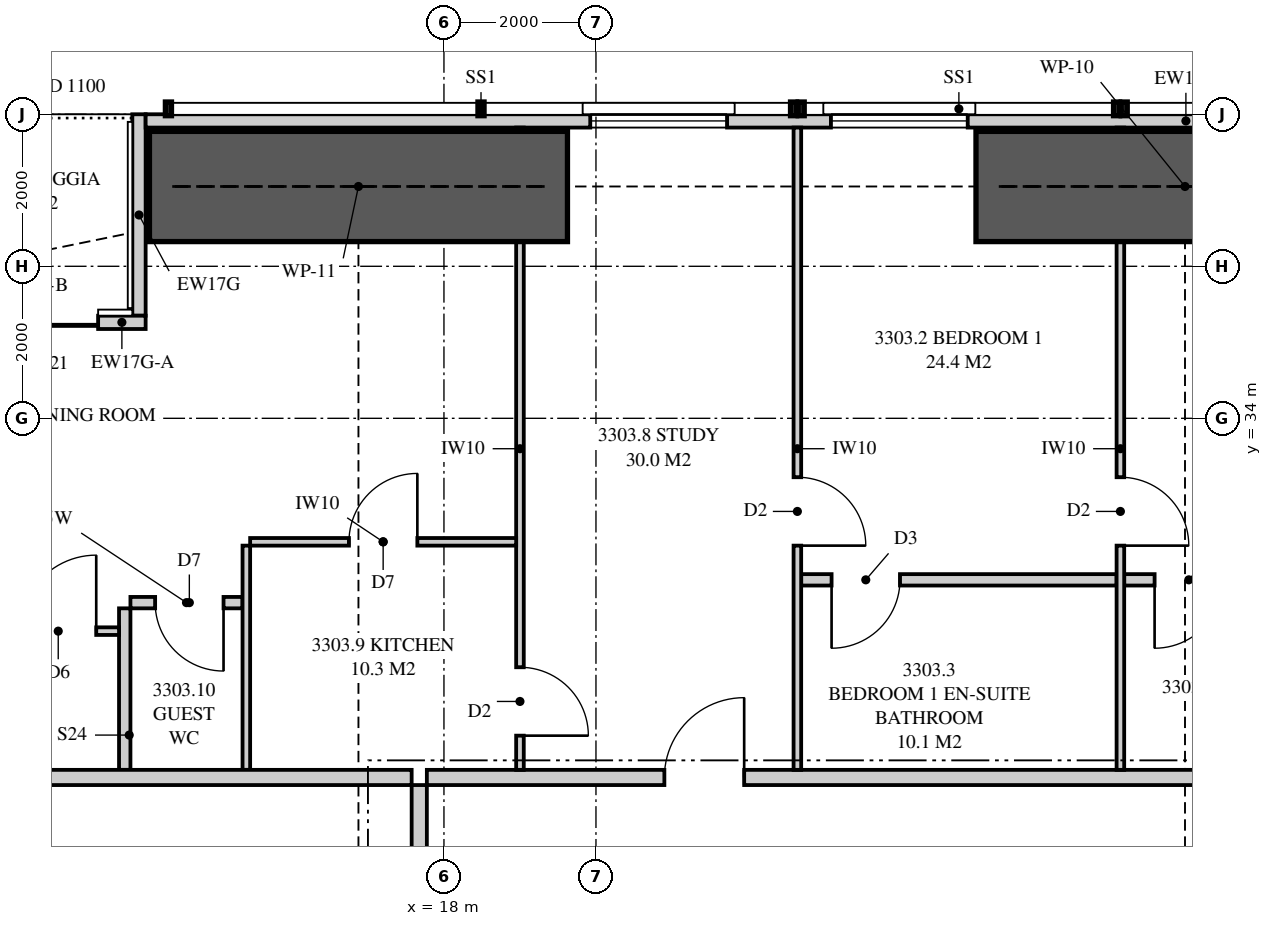
"""IFC4 building model, lengths in metres.
Left out: names, types, materials, properties, quantities, classifications, styles, units other than length and angle.
Written with IfcOpenShell. Run it as: python <this file> out.ifc"""

import sys

from ifc_helpers import new_model, si_unit, direction, frame, frame_2d, origin, place, context, subcontext, project, spatial, polyline, rectangle, outline, extrude, element, fill, save


model = new_model("IFC4")
c1 = context("Model", 3, precision=1e-05, world=origin(), true_north=direction((0.0, 1.0)))
c2 = subcontext(c1, "Body", "Model", "MODEL_VIEW")
j1 = project(units=[si_unit("LENGTHUNIT", "METRE"), si_unit("PLANEANGLEUNIT", "RADIAN")], contexts=[c1])
p1 = place(None, origin())
s1 = spatial("IfcSite", under=j1, at=p1, CompositionType="ELEMENT")
p2 = place(p1, origin())
s2 = spatial("IfcBuilding", under=s1, at=p2, CompositionType="ELEMENT")
p3 = place(p2, frame((0.0, 0.0, 121.6)))
s3 = spatial("IfcBuildingStorey", under=s2, at=p3, CompositionType="ELEMENT", Elevation=121.6)
p4 = place(p3, frame((41.449, 37.913, 0.0), z_axis=(0.0, 0.0, 1.0), x_axis=(-1.0, 0.0, 0.0)))
e1 = element("IfcWall", 1, at=p4, inside=s3, PredefinedType="SOLIDWALL", context=c2, shape_type="SweptSolid", body=[
    extrude(outline(polyline([(0.0, 0.0), (27.374, 0.0), (27.374, 3.11), (24.777, 3.11), (24.777, 2.15), (24.732, 2.15), (24.732, 3.11), (24.574, 3.11), (24.574, 2.15), (2.824, 2.15), (2.824, 3.11), (2.666, 3.11), (2.666, 2.15), (2.62, 2.15), (2.62, 3.11), (0.0, 3.11), (0.0, 0.0)])), frame((0.0, 0.087, 0.0), z_axis=(0.0, -1.0, 0.0), x_axis=(1.0, 0.0, 0.0)), (0.0, 0.0, 1.0), 0.175),
])
p5 = place(p4, frame((5.699, 0.0, 0.4)))
e2 = element("IfcOpeningElement", 2, at=p5, cuts=e1, PredefinedType="OPENING", context=c2, shape_type="SweptSolid", body=[
    extrude(rectangle(XDim=1.8, YDim=1.7, at=frame_2d((0.9, 0.85))), frame((0.0, 0.097, 0.0), z_axis=(0.0, -1.0, 0.0), x_axis=(1.0, 0.0, 0.0)), (0.0, 0.0, 1.0), 0.195),
])
p6 = place(p4, frame((9.034, 0.0, 0.4)))
e3 = element("IfcOpeningElement", 3, at=p6, cuts=e1, PredefinedType="OPENING", context=c2, shape_type="SweptSolid", body=[
    extrude(rectangle(XDim=1.8, YDim=1.7, at=frame_2d((0.9, 0.85))), frame((0.0, 0.097, 0.0), z_axis=(0.0, -1.0, 0.0), x_axis=(1.0, 0.0, 0.0)), (0.0, 0.0, 1.0), 0.195),
])
p7 = place(p4, frame((16.558, 0.0, 0.4)))
e4 = element("IfcOpeningElement", 4, at=p7, cuts=e1, PredefinedType="OPENING", context=c2, shape_type="SweptSolid", body=[
    extrude(rectangle(XDim=1.8, YDim=1.7, at=frame_2d((0.9, 0.85))), frame((0.0, 0.097, 0.0), z_axis=(0.0, -1.0, 0.0), x_axis=(1.0, 0.0, 0.0)), (0.0, 0.0, 1.0), 0.195),
])
p8 = place(p4, frame((19.724, 0.0, 0.4)))
e5 = element("IfcOpeningElement", 5, at=p8, cuts=e1, PredefinedType="OPENING", context=c2, shape_type="SweptSolid", body=[
    extrude(rectangle(XDim=1.8, YDim=1.7, at=frame_2d((0.9, 0.85))), frame((0.0, 0.097, 0.0), z_axis=(0.0, -1.0, 0.0), x_axis=(1.0, 0.0, 0.0)), (0.0, 0.0, 1.0), 0.195),
])
p9 = place(p3, frame((14.075, 35.262, 0.0), z_axis=(0.0, 0.0, 1.0), x_axis=(-1.0, 0.0, 0.0)))
e6 = element("IfcWall", 6, at=p9, inside=s3, PredefinedType="SOLIDWALL", context=c2, shape_type="SweptSolid", body=[
    extrude(rectangle(XDim=0.625, YDim=0.175, at=frame_2d((0.312, 0.0))), origin(), (0.0, 0.0, 1.0), 3.11),
])
p10 = place(p3, frame((13.45, 35.262, 0.0), z_axis=(0.0, 0.0, 1.0), x_axis=(-1.0, 0.0, 0.0)))
e7 = element("IfcWall", 7, at=p10, inside=s3, PredefinedType="SOLIDWALL", context=c2, shape_type="SweptSolid", body=[
    extrude(rectangle(XDim=2.425, YDim=0.175, at=frame_2d((1.212, 0.0))), origin(), (0.0, 0.0, 1.0), 2.15),
])
p11 = place(p10, origin())
e8 = element("IfcOpeningElement", 8, at=p11, cuts=e7, PredefinedType="OPENING", context=c2, shape_type="SweptSolid", body=[
    extrude(rectangle(XDim=1.8, YDim=2.1, at=frame_2d((0.9, 1.05))), frame((0.0, 0.097, 0.0), z_axis=(0.0, -1.0, 0.0), x_axis=(1.0, 0.0, 0.0)), (0.0, 0.0, 1.0), 0.195),
])
p12 = place(p3, frame((13.988, 38.0, 0.0), z_axis=(0.0, 0.0, 1.0), x_axis=(0.0, -1.0, 0.0)))
e9 = element("IfcWall", 9, at=p12, inside=s3, PredefinedType="SOLIDWALL", context=c2, shape_type="SweptSolid", body=[
    extrude(outline(polyline([(0.0, 0.0), (2.65, 0.0), (2.65, 3.11), (2.373, 3.11), (2.373, 2.15), (0.705, 2.15), (0.705, 3.11), (0.0, 3.11), (0.0, 0.0)])), frame((0.0, 0.087, 0.0), z_axis=(0.0, -1.0, 0.0), x_axis=(1.0, 0.0, 0.0)), (0.0, 0.0, 1.0), 0.175),
])
p13 = place(p3, frame((17.775, 29.275, 0.0), z_axis=(0.0, 0.0, 1.0), x_axis=(1.0, 0.0, 0.0)))
e10 = element("IfcWall", 10, at=p13, inside=s3, PredefinedType="PARTITIONING", context=c2, shape_type="SweptSolid", body=[
    extrude(outline(polyline([(0.0, 0.0), (18.925, 0.0), (18.925, 3.11), (10.312, 3.11), (10.312, 2.541), (9.638, 2.541), (9.638, 3.11), (0.0, 3.11), (0.0, 0.0)])), frame((0.0, 0.1, 0.0), z_axis=(0.0, -1.0, 0.0), x_axis=(1.0, 0.0, 0.0)), (0.0, 0.0, 1.0), 0.2),
])
p14 = place(p13, frame((3.125, 0.0, 0.0)))
e11 = element("IfcOpeningElement", 11, at=p14, cuts=e10, PredefinedType="OPENING", context=c2, shape_type="SweptSolid", body=[
    extrude(rectangle(XDim=1.05, YDim=2.2, at=frame_2d((0.525, 1.1))), frame((0.0, 0.11, 0.0), z_axis=(0.0, -1.0, 0.0), x_axis=(1.0, 0.0, 0.0)), (0.0, 0.0, 1.0), 0.22),
])
p15 = place(p3, frame((22.65, 37.825, 0.0), z_axis=(0.0, 0.0, 1.0), x_axis=(0.0, -1.0, 0.0)))
e12 = element("IfcWall", 12, at=p15, inside=s3, PredefinedType="PARTITIONING", context=c2, shape_type="SweptSolid", body=[
    extrude(outline(polyline([(0.0, 0.0), (8.45, 0.0), (8.45, 3.11), (1.635, 3.11), (1.635, 2.15), (0.0, 2.15), (0.0, 3.11), (0.0, 0.0)])), frame((0.0, 0.05, 0.0), z_axis=(0.0, -1.0, 0.0), x_axis=(1.0, 0.0, 0.0)), (0.0, 0.0, 1.0), 0.1),
])
p16 = place(p15, frame((4.6, 0.0, 0.0)))
e13 = element("IfcOpeningElement", 13, at=p16, cuts=e12, PredefinedType="OPENING", context=c2, shape_type="SweptSolid", body=[
    extrude(rectangle(XDim=0.9, YDim=2.1, at=frame_2d((0.45, 1.05))), frame((0.0, 0.06, 0.0), z_axis=(0.0, -1.0, 0.0), x_axis=(1.0, 0.0, 0.0)), (0.0, 0.0, 1.0), 0.12),
])
p17 = place(p3, frame((26.9, 37.825, 0.0), z_axis=(0.0, 0.0, 1.0), x_axis=(0.0, -1.0, 0.0)))
e14 = element("IfcWall", 14, at=p17, inside=s3, PredefinedType="PARTITIONING", context=c2, shape_type="SweptSolid", body=[
    extrude(outline(polyline([(0.529, 2.15), (0.0, 2.15), (0.0, 0.0), (0.529, 0.0), (0.529, 0.889), (1.021, 0.889), (1.021, 0.0), (8.45, 0.0), (8.45, 3.11), (1.635, 3.11), (1.635, 2.15), (1.021, 2.15), (1.021, 1.261), (0.529, 1.261), (0.529, 2.15)])), frame((0.0, 0.05, 0.0), z_axis=(0.0, -1.0, 0.0), x_axis=(1.0, 0.0, 0.0)), (0.0, 0.0, 1.0), 0.1),
])
p18 = place(p17, frame((4.6, 0.0, 0.0)))
e15 = element("IfcOpeningElement", 15, at=p18, cuts=e14, PredefinedType="OPENING", context=c2, shape_type="SweptSolid", body=[
    extrude(rectangle(XDim=0.9, YDim=2.1, at=frame_2d((0.45, 1.05))), frame((0.0, 0.06, 0.0), z_axis=(0.0, -1.0, 0.0), x_axis=(1.0, 0.0, 0.0)), (0.0, 0.0, 1.0), 0.12),
])
p19 = place(p3, frame((22.7, 31.875, 0.0), z_axis=(0.0, 0.0, 1.0), x_axis=(1.0, 0.0, 0.0)))
e16 = element("IfcWall", 16, at=p19, inside=s3, PredefinedType="PLUMBINGWALL", context=c2, shape_type="SweptSolid", body=[
    extrude(rectangle(XDim=4.15, YDim=0.15, at=frame_2d((2.075, 0.0))), origin(), (0.0, 0.0, 1.0), 3.11),
])
p20 = place(p19, frame((0.4, 0.0, 0.0)))
e17 = element("IfcOpeningElement", 17, at=p20, cuts=e16, PredefinedType="OPENING", context=c2, shape_type="SweptSolid", body=[
    extrude(rectangle(XDim=0.9, YDim=2.1, at=frame_2d((0.45, 1.05))), frame((0.0, 0.085, 0.0), z_axis=(0.0, -1.0, 0.0), x_axis=(1.0, 0.0, 0.0)), (0.0, 0.0, 1.0), 0.17),
])
p21 = place(p3, frame((26.95, 31.875, 0.0), z_axis=(0.0, 0.0, 1.0), x_axis=(1.0, 0.0, 0.0)))
e18 = element("IfcWall", 18, at=p21, inside=s3, PredefinedType="PLUMBINGWALL", context=c2, shape_type="SweptSolid", body=[
    extrude(outline(polyline([(0.0, 0.0), (5.9, 0.0), (5.9, 3.11), (1.112, 3.11), (1.112, 2.541), (0.488, 2.541), (0.488, 3.11), (0.0, 3.11), (0.0, 0.0)])), frame((0.0, 0.075, 0.0), z_axis=(0.0, -1.0, 0.0), x_axis=(1.0, 0.0, 0.0)), (0.0, 0.0, 1.0), 0.15),
])
p22 = place(p21, frame((0.4, 0.0, 0.0)))
e19 = element("IfcOpeningElement", 19, at=p22, cuts=e18, PredefinedType="OPENING", context=c2, shape_type="SweptSolid", body=[
    extrude(rectangle(XDim=0.9, YDim=2.1, at=frame_2d((0.45, 1.05))), frame((0.0, 0.085, 0.0), z_axis=(0.0, -1.0, 0.0), x_axis=(1.0, 0.0, 0.0)), (0.0, 0.0, 1.0), 0.17),
])
p23 = place(p3, frame((19.0, 37.825, 0.0), z_axis=(0.0, 0.0, 1.0), x_axis=(0.0, -1.0, 0.0)))
e20 = element("IfcWall", 20, at=p23, inside=s3, PredefinedType="PARTITIONING", context=c2, shape_type="SweptSolid", body=[
    extrude(outline(polyline([(0.529, 2.15), (0.0, 2.15), (0.0, 0.0), (0.529, 0.0), (0.529, 0.017), (1.021, 0.017), (1.021, 0.0), (8.45, 0.0), (8.45, 3.11), (1.635, 3.11), (1.635, 2.15), (1.021, 2.15), (1.021, 2.133), (0.529, 2.133), (0.529, 2.15)])), frame((0.0, 0.05, 0.0), z_axis=(0.0, -1.0, 0.0), x_axis=(1.0, 0.0, 0.0)), (0.0, 0.0, 1.0), 0.1),
])
p24 = place(p23, frame((7.1, 0.0, 0.0)))
e21 = element("IfcOpeningElement", 21, at=p24, cuts=e20, PredefinedType="OPENING", context=c2, shape_type="SweptSolid", body=[
    extrude(rectangle(XDim=0.9, YDim=2.1, at=frame_2d((0.45, 1.05))), frame((0.0, 0.06, 0.0), z_axis=(0.0, -1.0, 0.0), x_axis=(1.0, 0.0, 0.0)), (0.0, 0.0, 1.0), 0.12),
])
p25 = place(p3, frame((15.45, 32.375, 0.0), z_axis=(0.0, 0.0, 1.0), x_axis=(1.0, 0.0, 0.0)))
e22 = element("IfcWall", 22, at=p25, inside=s3, PredefinedType="PARTITIONING", context=c2, shape_type="SweptSolid", body=[
    extrude(outline(polyline([(0.0, 0.0), (3.5, 0.0), (3.5, 3.11), (1.712, 3.11), (1.712, 2.541), (1.138, 2.541), (1.138, 3.11), (0.0, 3.11), (0.0, 0.0)])), frame((0.0, 0.05, 0.0), z_axis=(0.0, -1.0, 0.0), x_axis=(1.0, 0.0, 0.0)), (0.0, 0.0, 1.0), 0.1),
])
p26 = place(p25, frame((1.3, 0.0, 0.0)))
e23 = element("IfcOpeningElement", 23, at=p26, cuts=e22, PredefinedType="OPENING", context=c2, shape_type="SweptSolid", body=[
    extrude(rectangle(XDim=0.9, YDim=2.1, at=frame_2d((0.45, 1.05))), frame((0.0, 0.06, 0.0), z_axis=(0.0, -1.0, 0.0), x_axis=(1.0, 0.0, 0.0)), (0.0, 0.0, 1.0), 0.12),
])
p27 = place(p3, frame((15.4, 32.325, 0.0), z_axis=(0.0, 0.0, 1.0), x_axis=(0.0, -1.0, 0.0)))
e24 = element("IfcWall", 24, at=p27, inside=s3, PredefinedType="PARTITIONING", context=c2, shape_type="SweptSolid", body=[
    extrude(rectangle(XDim=2.95, YDim=0.1, at=frame_2d((1.475, 0.0))), origin(), (0.0, 0.0, 1.0), 3.11),
])
p28 = place(p3, frame((13.875, 31.575, 0.0), z_axis=(0.0, 0.0, 1.0), x_axis=(1.0, 0.0, 0.0)))
e25 = element("IfcWall", 25, at=p28, inside=s3, PredefinedType="PLUMBINGWALL", context=c2, shape_type="SweptSolid", body=[
    extrude(rectangle(XDim=1.475, YDim=0.15, at=frame_2d((0.738, 0.0))), origin(), (0.0, 0.0, 1.0), 3.11),
])
p29 = place(p28, frame((0.325, 0.0, 0.0)))
e26 = element("IfcOpeningElement", 26, at=p29, cuts=e25, PredefinedType="OPENING", context=c2, shape_type="SweptSolid", body=[
    extrude(rectangle(XDim=0.9, YDim=2.1, at=frame_2d((0.45, 1.05))), frame((0.0, 0.085, 0.0), z_axis=(0.0, -1.0, 0.0), x_axis=(1.0, 0.0, 0.0)), (0.0, 0.0, 1.0), 0.17),
])
p30 = place(p3, frame((13.8, 31.5, 0.0), z_axis=(0.0, 0.0, 1.0), x_axis=(0.0, -1.0, 0.0)))
e27 = element("IfcWall", 27, at=p30, inside=s3, PredefinedType="PLUMBINGWALL", context=c2, shape_type="SweptSolid", body=[
    extrude(rectangle(XDim=2.125, YDim=0.15, at=frame_2d((1.062, 0.0))), origin(), (0.0, 0.0, 1.0), 3.11),
])
p31 = place(p3, frame((6.175, 31.2, 0.0), z_axis=(0.0, 0.0, 1.0), x_axis=(1.0, 0.0, 0.0)))
e28 = element("IfcWall", 28, at=p31, inside=s3, PredefinedType="PARTITIONING", context=c2, shape_type="SweptSolid", body=[
    extrude(outline(polyline([(0.0, 0.0), (7.55, 0.0), (7.55, 3.11), (5.285, 3.11), (5.285, 2.51), (2.765, 2.51), (2.765, 3.11), (2.744, 3.11), (2.744, 2.541), (2.652, 2.541), (2.652, 2.15), (0.909, 2.15), (0.909, 3.11), (0.0, 3.11), (0.0, 0.0)])), frame((0.0, 0.05, 0.0), z_axis=(0.0, -1.0, 0.0), x_axis=(1.0, 0.0, 0.0)), (0.0, 0.0, 1.0), 0.1),
])
p32 = place(p31, frame((6.25, 0.0, 0.0)))
e29 = element("IfcOpeningElement", 29, at=p32, cuts=e28, PredefinedType="OPENING", context=c2, shape_type="SweptSolid", body=[
    extrude(rectangle(XDim=1.0, YDim=2.1, at=frame_2d((0.5, 1.05))), frame((0.0, 0.06, 0.0), z_axis=(0.0, -1.0, 0.0), x_axis=(1.0, 0.0, 0.0)), (0.0, 0.0, 1.0), 0.12),
])
p33 = place(p3, frame((6.0, 29.275, 0.0), z_axis=(0.0, 0.0, 1.0), x_axis=(1.0, 0.0, 0.0)))
e30 = element("IfcWall", 30, at=p33, inside=s3, PredefinedType="PARTITIONING", context=c2, shape_type="SweptSolid", body=[
    extrude(outline(polyline([(0.0, 0.0), (11.575, 0.0), (11.575, 3.11), (11.212, 3.11), (11.212, 2.541), (10.538, 2.541), (10.538, 3.11), (5.51, 3.11), (5.51, 2.51), (2.969, 2.51), (2.969, 2.541), (2.565, 2.541), (2.565, 2.15), (0.721, 2.15), (0.721, 3.11), (0.0, 3.11), (0.0, 0.0)])), frame((0.0, 0.1, 0.0), z_axis=(0.0, -1.0, 0.0), x_axis=(1.0, 0.0, 0.0)), (0.0, 0.0, 1.0), 0.2),
])
p34 = place(p3, frame((17.675, 19.7, 0.0), z_axis=(0.0, 0.0, 1.0), x_axis=(0.0, 1.0, 0.0)))
e31 = element("IfcWall", 31, at=p34, inside=s3, PredefinedType="PARTITIONING", context=c2, shape_type="SweptSolid", body=[
    extrude(outline(polyline([(0.0, 0.0), (9.475, 0.0), (9.475, 3.11), (7.062, 3.11), (7.062, 2.541), (6.388, 2.541), (6.388, 3.11), (0.0, 3.11), (0.0, 0.0)])), frame((0.0, 0.1, 0.0), z_axis=(0.0, -1.0, 0.0), x_axis=(1.0, 0.0, 0.0)), (0.0, 0.0, 1.0), 0.2),
])
for number, where, z_axis, x_axis in (
    (32, (25.0, 37.05, 0.0), (0.0, 0.0, 1.0), (1.0, 0.0, 0.0)),
    (33, (14.125, 37.05, 0.0), (0.0, 0.0, 1.0), (1.0, 0.0, 0.0)),
):
    element("IfcWall", number, at=place(p3, frame(where, z_axis=z_axis, x_axis=x_axis)), inside=s3, PredefinedType="SHEAR", context=c2, shape_type="SweptSolid", body=[
        extrude(rectangle(XDim=5.5, YDim=1.45, at=frame_2d((2.75, 0.0))), origin(), (0.0, 0.0, 1.0), 3.35),
    ])
p35 = place(p7, origin())
e34 = element("IfcWindow", 34, at=p35, inside=s3, PartitioningType="SINGLE_PANEL", PredefinedType="WINDOW", context=c2, shape_type="SweptSolid", body=[
    extrude(rectangle(XDim=1.8, YDim=1.7, at=frame_2d((0.9, 0.85))), frame((0.0, 0.03, 0.0), z_axis=(0.0, -1.0, 0.0), x_axis=(1.0, 0.0, 0.0)), (0.0, 0.0, 1.0), 0.06),
])
fill(e4, e34)
p36 = place(p8, origin())
e35 = element("IfcWindow", 35, at=p36, inside=s3, PartitioningType="SINGLE_PANEL", PredefinedType="WINDOW", context=c2, shape_type="SweptSolid", body=[
    extrude(rectangle(XDim=1.8, YDim=1.7, at=frame_2d((0.9, 0.85))), frame((0.0, 0.03, 0.0), z_axis=(0.0, -1.0, 0.0), x_axis=(1.0, 0.0, 0.0)), (0.0, 0.0, 1.0), 0.06),
])
fill(e5, e35)
p37 = place(p11, origin())
e36 = element("IfcDoor", 36, at=p37, inside=s3, OperationType="SLIDING_TO_LEFT", PredefinedType="DOOR", context=c2, shape_type="SweptSolid", body=[
    extrude(rectangle(XDim=1.8, YDim=2.1, at=frame_2d((0.9, 1.05))), frame((0.0, 0.025, 0.0), z_axis=(0.0, -1.0, 0.0), x_axis=(1.0, 0.0, 0.0)), (0.0, 0.0, 1.0), 0.05),
])
fill(e8, e36)
p38 = place(p14, origin())
e37 = element("IfcDoor", 37, at=p38, inside=s3, OperationType="SINGLE_SWING_RIGHT", PredefinedType="DOOR", context=c2, shape_type="SweptSolid", body=[
    extrude(rectangle(XDim=1.05, YDim=2.2, at=frame_2d((0.525, 1.1))), frame((0.0, 0.025, 0.0), z_axis=(0.0, -1.0, 0.0), x_axis=(1.0, 0.0, 0.0)), (0.0, 0.0, 1.0), 0.05),
])
fill(e11, e37)
p39 = place(p16, origin())
e38 = element("IfcDoor", 38, at=p39, inside=s3, OperationType="SINGLE_SWING_RIGHT", PredefinedType="DOOR", context=c2, shape_type="SweptSolid", body=[
    extrude(rectangle(XDim=0.9, YDim=2.1, at=frame_2d((0.45, 1.05))), frame((0.0, 0.025, 0.0), z_axis=(0.0, -1.0, 0.0), x_axis=(1.0, 0.0, 0.0)), (0.0, 0.0, 1.0), 0.05),
])
fill(e13, e38)
p40 = place(p20, frame((0.9, 0.0, 0.0), z_axis=(0.0, 0.0, 1.0), x_axis=(-1.0, 0.0, 0.0)))
e39 = element("IfcDoor", 39, at=p40, inside=s3, OperationType="SINGLE_SWING_RIGHT", PredefinedType="DOOR", context=c2, shape_type="SweptSolid", body=[
    extrude(rectangle(XDim=0.9, YDim=2.1, at=frame_2d((0.45, 1.05))), frame((0.0, 0.025, 0.0), z_axis=(0.0, -1.0, 0.0), x_axis=(1.0, 0.0, 0.0)), (0.0, 0.0, 1.0), 0.05),
])
fill(e17, e39)
p41 = place(p18, origin())
e40 = element("IfcDoor", 40, at=p41, inside=s3, OperationType="SINGLE_SWING_RIGHT", PredefinedType="DOOR", context=c2, shape_type="SweptSolid", body=[
    extrude(rectangle(XDim=0.9, YDim=2.1, at=frame_2d((0.45, 1.05))), frame((0.0, 0.025, 0.0), z_axis=(0.0, -1.0, 0.0), x_axis=(1.0, 0.0, 0.0)), (0.0, 0.0, 1.0), 0.05),
])
fill(e15, e40)
p42 = place(p22, frame((0.9, 0.0, 0.0), z_axis=(0.0, 0.0, 1.0), x_axis=(-1.0, 0.0, 0.0)))
e41 = element("IfcDoor", 41, at=p42, inside=s3, OperationType="SINGLE_SWING_RIGHT", PredefinedType="DOOR", context=c2, shape_type="SweptSolid", body=[
    extrude(rectangle(XDim=0.9, YDim=2.1, at=frame_2d((0.45, 1.05))), frame((0.0, 0.025, 0.0), z_axis=(0.0, -1.0, 0.0), x_axis=(1.0, 0.0, 0.0)), (0.0, 0.0, 1.0), 0.05),
])
fill(e19, e41)
p43 = place(p24, origin())
e42 = element("IfcDoor", 42, at=p43, inside=s3, OperationType="SINGLE_SWING_RIGHT", PredefinedType="DOOR", context=c2, shape_type="SweptSolid", body=[
    extrude(rectangle(XDim=0.9, YDim=2.1, at=frame_2d((0.45, 1.05))), frame((0.0, 0.025, 0.0), z_axis=(0.0, -1.0, 0.0), x_axis=(1.0, 0.0, 0.0)), (0.0, 0.0, 1.0), 0.05),
])
fill(e21, e42)
p44 = place(p26, origin())
e43 = element("IfcDoor", 43, at=p44, inside=s3, OperationType="SINGLE_SWING_RIGHT", PredefinedType="DOOR", context=c2, shape_type="SweptSolid", body=[
    extrude(rectangle(XDim=0.9, YDim=2.1, at=frame_2d((0.45, 1.05))), frame((0.0, 0.025, 0.0), z_axis=(0.0, -1.0, 0.0), x_axis=(1.0, 0.0, 0.0)), (0.0, 0.0, 1.0), 0.05),
])
fill(e23, e43)
p45 = place(p29, frame((0.9, 0.0, 0.0), z_axis=(0.0, 0.0, 1.0), x_axis=(-1.0, 0.0, 0.0)))
e44 = element("IfcDoor", 44, at=p45, inside=s3, OperationType="SINGLE_SWING_LEFT", PredefinedType="DOOR", context=c2, shape_type="SweptSolid", body=[
    extrude(rectangle(XDim=0.9, YDim=2.1, at=frame_2d((0.45, 1.05))), frame((0.0, 0.025, 0.0), z_axis=(0.0, -1.0, 0.0), x_axis=(1.0, 0.0, 0.0)), (0.0, 0.0, 1.0), 0.05),
])
fill(e26, e44)
p46 = place(p32, origin())
e45 = element("IfcDoor", 45, at=p46, inside=s3, OperationType="SINGLE_SWING_RIGHT", PredefinedType="DOOR", context=c2, shape_type="SweptSolid", body=[
    extrude(rectangle(XDim=1.0, YDim=2.1, at=frame_2d((0.5, 1.05))), frame((0.0, 0.025, 0.0), z_axis=(0.0, -1.0, 0.0), x_axis=(1.0, 0.0, 0.0)), (0.0, 0.0, 1.0), 0.05),
])
fill(e29, e45)
save(model, sys.argv[1])
